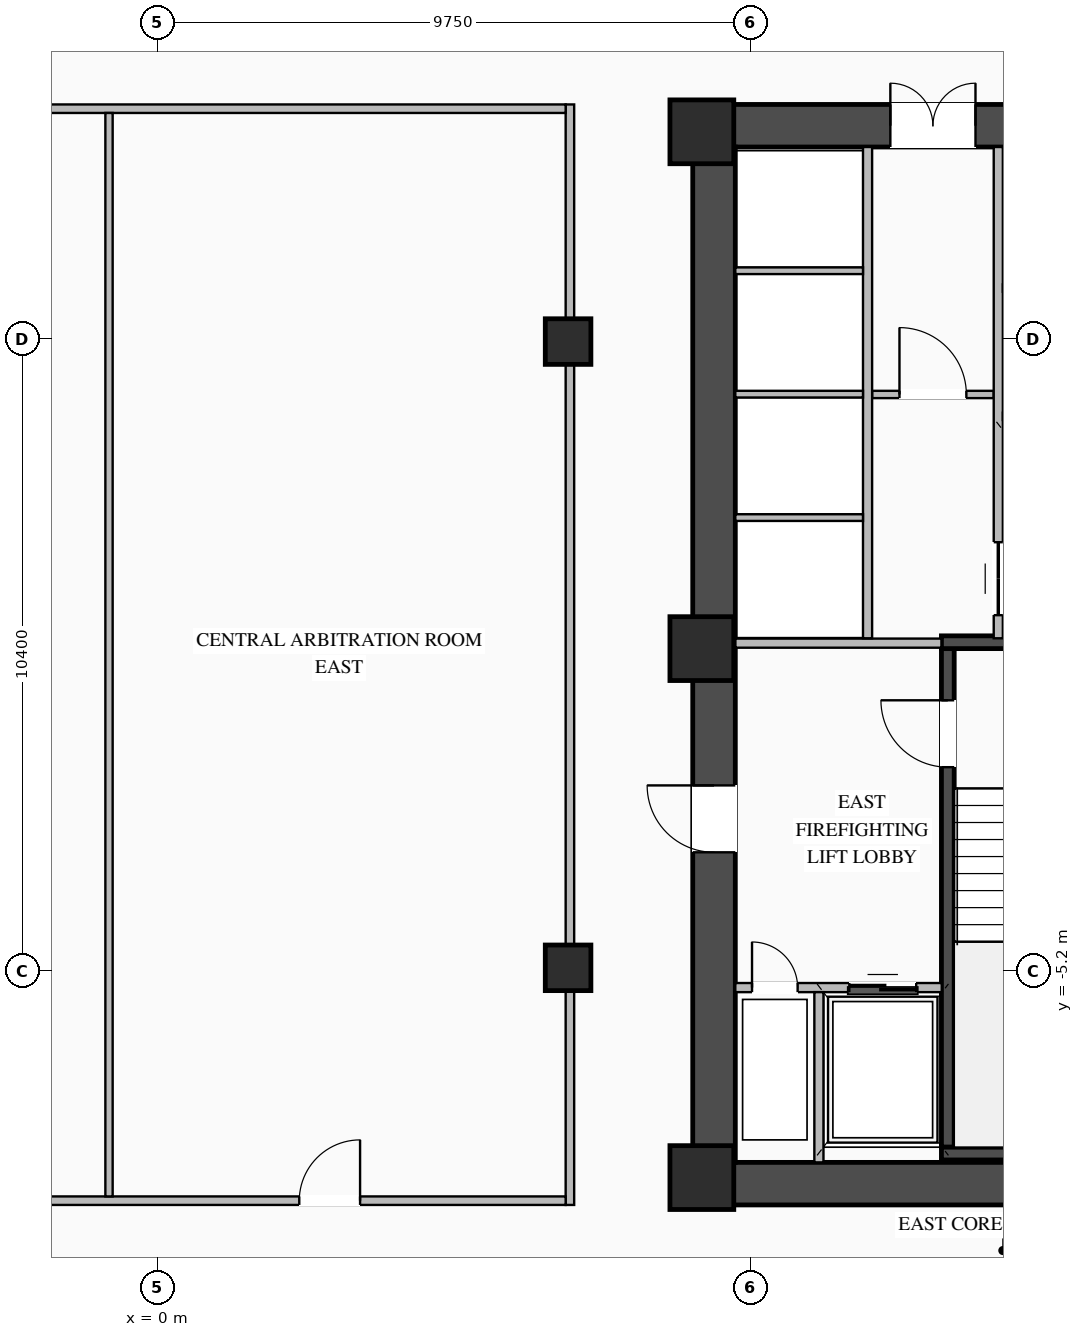
"""IFC4 building model, lengths in metres.
Left out: names, types, materials, properties, quantities, classifications, styles, units other than length and angle.
Written with IfcOpenShell. Run it as: python <this file> out.ifc"""

import sys

from ifc_helpers import new_model, si_unit, direction, frame, frame_2d, origin, origin_2d, place, context, subcontext, project, spatial, rectangle, i_section, extrude, element, fill, save


model = new_model("IFC4")
c1 = context("Model", 3, precision=1e-05, world=origin(), true_north=direction((0.0, 1.0)))
c2 = subcontext(c1, "Body", "Model", "MODEL_VIEW")
j1 = project(units=[si_unit("LENGTHUNIT", "METRE"), si_unit("PLANEANGLEUNIT", "RADIAN")], contexts=[c1])
p1 = place(None, origin())
s1 = spatial("IfcSite", under=j1, at=p1, CompositionType="ELEMENT")
p2 = place(p1, origin())
s2 = spatial("IfcBuilding", under=s1, at=p2, CompositionType="ELEMENT")
p3 = place(p2, frame((0.0, 0.0, 84.55)))
s3 = spatial("IfcBuildingStorey", under=s2, at=p3, CompositionType="ELEMENT", Elevation=84.55)
p4 = place(p3, frame((8.8, -8.7, 0.0), z_axis=(0.0, 0.0, 1.0), x_axis=(1.0, 0.0, 0.0)))
e1 = element("IfcWall", 1, at=p4, inside=s3, PredefinedType="SHEAR", context=c2, shape_type="SweptSolid", body=[
    extrude(rectangle(XDim=10.25, YDim=0.7, at=frame_2d((5.125, 0.0))), origin(), (0.0, 0.0, 1.0), 3.27),
])
p5 = place(p3, frame((8.8, 8.7, 0.0), z_axis=(0.0, 0.0, 1.0), x_axis=(1.0, 0.0, 0.0)))
e2 = element("IfcWall", 2, at=p5, inside=s3, PredefinedType="SHEAR", context=c2, shape_type="SweptSolid", body=[
    extrude(rectangle(XDim=10.25, YDim=0.7, at=frame_2d((5.125, 0.0))), origin(), (0.0, 0.0, 1.0), 3.27),
])
p6 = place(p5, frame((3.25, 0.0, 0.0)))
e3 = element("IfcOpeningElement", 3, at=p6, cuts=e2, PredefinedType="OPENING", context=c2, shape_type="SweptSolid", body=[
    extrude(rectangle(XDim=1.4, YDim=2.05, at=frame_2d((0.7, 1.025))), frame((0.0, 0.36, 0.0), z_axis=(0.0, -1.0, 0.0), x_axis=(1.0, 0.0, 0.0)), (0.0, 0.0, 1.0), 0.72),
])
p7 = place(p3, frame((9.15, -8.35, 0.0), z_axis=(0.0, 0.0, 1.0), x_axis=(0.0, 1.0, 0.0)))
e4 = element("IfcWall", 4, at=p7, inside=s3, PredefinedType="SHEAR", context=c2, shape_type="SweptSolid", body=[
    extrude(rectangle(XDim=16.7, YDim=0.7, at=frame_2d((8.35, 0.0))), origin(), (0.0, 0.0, 1.0), 3.27),
])
p8 = place(p7, frame((5.1, 0.0, 0.0)))
e5 = element("IfcOpeningElement", 5, at=p8, cuts=e4, PredefinedType="OPENING", context=c2, shape_type="SweptSolid", body=[
    extrude(rectangle(XDim=1.1, YDim=2.08, at=frame_2d((0.55, 1.04))), frame((0.0, 0.36, 0.0), z_axis=(0.0, -1.0, 0.0), x_axis=(1.0, 0.0, 0.0)), (0.0, 0.0, 1.0), 0.72),
])
p9 = place(p3, frame((12.995, -8.1, 0.0), z_axis=(0.0, 0.0, 1.0), x_axis=(0.0, 1.0, 0.0)))
e6 = element("IfcWall", 6, at=p9, inside=s3, PredefinedType="SHEAR", context=c2, shape_type="SweptSolid", body=[
    extrude(rectangle(XDim=8.2, YDim=0.21, at=frame_2d((4.1, 0.0))), origin(), (0.0, 0.0, 1.0), 3.27),
])
p10 = place(p9, frame((6.25, 0.0, 0.0)))
e7 = element("IfcOpeningElement", 7, at=p10, cuts=e6, PredefinedType="OPENING", context=c2, shape_type="SweptSolid", body=[
    extrude(rectangle(XDim=1.1, YDim=2.15, at=frame_2d((0.55, 1.075))), frame((0.0, 0.115, 0.0), z_axis=(0.0, -1.0, 0.0), x_axis=(1.0, 0.0, 0.0)), (0.0, 0.0, 1.0), 0.23),
])
for number, where, z_axis, x_axis in (
    (8, (12.89, -8.205, 0.0), (0.0, 0.0, 1.0), (1.0, 0.0, 0.0)),
    (9, (18.03, 0.205, 0.0), (0.0, 0.0, 1.0), (-1.0, 0.0, 0.0)),
):
    element("IfcWall", number, at=place(p3, frame(where, z_axis=z_axis, x_axis=x_axis)), inside=s3, PredefinedType="SHEAR", context=c2, shape_type="SweptSolid", body=[
        extrude(rectangle(XDim=5.14, YDim=0.21, at=frame_2d((2.57, 0.0))), origin(), (0.0, 0.0, 1.0), 3.27),
    ])
for number, where, z_axis, x_axis in (
    (10, (8.95, -8.6, 0.0), (0.0, 0.0, 1.0), (1.0, 0.0, 0.0)),
    (11, (8.95, 0.1, 0.0), (0.0, 0.0, 1.0), (1.0, 0.0, 0.0)),
    (12, (8.95, 8.6, 0.0), (0.0, 0.0, 1.0), (1.0, 0.0, 0.0)),
):
    element("IfcColumn", number, at=place(p3, frame(where, z_axis=z_axis, x_axis=x_axis)), inside=s3, PredefinedType="COLUMN", context=c2, shape_type="SweptSolid", body=[
        extrude(rectangle(XDim=1.05, YDim=1.05, at=origin_2d()), origin(), (0.0, 0.0, 1.0), 3.45),
    ])
for number, where, z_axis, x_axis in (
    (13, (6.75, -5.15, 0.0), (0.0, 0.0, 1.0), (1.0, 0.0, 0.0)),
    (14, (6.75, 5.15, 0.0), (0.0, 0.0, 1.0), (1.0, 0.0, 0.0)),
):
    element("IfcColumn", number, at=place(p3, frame(where, z_axis=z_axis, x_axis=x_axis)), inside=s3, PredefinedType="COLUMN", context=c2, shape_type="SweptSolid", body=[
        extrude(i_section(OverallWidth=0.75, OverallDepth=0.75, WebThickness=0.03, FlangeThickness=0.044, at=origin_2d()), origin(), (0.0, 0.0, 1.0), 3.45),
    ])
p11 = place(p3, frame((9.5, -5.475, 0.0), z_axis=(0.0, 0.0, 1.0), x_axis=(1.0, 0.0, 0.0)))
e15 = element("IfcWall", 15, at=p11, inside=s3, PredefinedType="STANDARD", context=c2, shape_type="SweptSolid", body=[
    extrude(rectangle(XDim=3.395, YDim=0.15, at=frame_2d((1.698, 0.0))), origin(), (0.0, 0.0, 1.0), 3.25),
])
p12 = place(p11, frame((1.875, 0.0, 0.0)))
e16 = element("IfcOpeningElement", 16, at=p12, cuts=e15, PredefinedType="OPENING", context=c2, shape_type="SweptSolid", body=[
    extrude(rectangle(XDim=1.1, YDim=2.15, at=frame_2d((0.55, 1.075))), frame((0.0, 0.085, 0.0), z_axis=(0.0, -1.0, 0.0), x_axis=(1.0, 0.0, 0.0)), (0.0, 0.0, 1.0), 0.17),
])
p13 = place(p11, frame((0.275, 0.0, 0.0)))
e17 = element("IfcOpeningElement", 17, at=p13, cuts=e15, PredefinedType="OPENING", context=c2, shape_type="SweptSolid", body=[
    extrude(rectangle(XDim=0.75, YDim=2.05, at=frame_2d((0.375, 1.025))), frame((0.0, 0.085, 0.0), z_axis=(0.0, -1.0, 0.0), x_axis=(1.0, 0.0, 0.0)), (0.0, 0.0, 1.0), 0.17),
])
p14 = place(p3, frame((10.875, -8.35, 0.0), z_axis=(0.0, 0.0, 1.0), x_axis=(0.0, 1.0, 0.0)))
e18 = element("IfcWall", 18, at=p14, inside=s3, PredefinedType="STANDARD", context=c2, shape_type="SweptSolid", body=[
    extrude(rectangle(XDim=2.8, YDim=0.15, at=frame_2d((1.4, 0.0))), origin(), (0.0, 0.0, 1.0), 3.25),
])
p15 = place(p3, frame((9.5, 0.19, 0.0), z_axis=(0.0, 0.0, 1.0), x_axis=(1.0, 0.0, 0.0)))
e19 = element("IfcWall", 19, at=p15, inside=s3, PredefinedType="STANDARD", context=c2, shape_type="SweptSolid", body=[
    extrude(rectangle(XDim=3.39, YDim=0.15, at=frame_2d((1.695, 0.0))), origin(), (0.0, 0.0, 1.0), 2.645),
])
p16 = place(p3, frame((11.75, 4.28, 0.0), z_axis=(0.0, 0.0, 1.0), x_axis=(1.0, 0.0, 0.0)))
e20 = element("IfcWall", 20, at=p16, inside=s3, PredefinedType="STANDARD", context=c2, shape_type="SweptSolid", body=[
    extrude(rectangle(XDim=2.0, YDim=0.12, at=frame_2d((1.0, 0.0))), origin(), (0.0, 0.0, 1.0), 3.25),
])
p17 = place(p16, frame((0.45, 0.0, 0.0)))
e21 = element("IfcOpeningElement", 21, at=p17, cuts=e20, PredefinedType="OPENING", context=c2, shape_type="SweptSolid", body=[
    extrude(rectangle(XDim=1.1, YDim=2.1, at=frame_2d((0.55, 1.05))), frame((0.0, 0.07, 0.0), z_axis=(0.0, -1.0, 0.0), x_axis=(1.0, 0.0, 0.0)), (0.0, 0.0, 1.0), 0.14),
])
p18 = place(p3, frame((11.675, 0.27, 0.0), z_axis=(0.0, 0.0, 1.0), x_axis=(0.0, 1.0, 0.0)))
e22 = element("IfcWall", 22, at=p18, inside=s3, PredefinedType="STANDARD", context=c2, shape_type="SweptSolid", body=[
    extrude(rectangle(XDim=8.08, YDim=0.15, at=frame_2d((4.04, 0.0))), origin(), (0.0, 0.0, 1.0), 3.25),
])
for number, where, z_axis, x_axis in (
    (23, (9.5, 2.255, 0.0), (0.0, 0.0, 1.0), (1.0, 0.0, 0.0)),
    (24, (9.5, 4.285, 0.0), (0.0, 0.0, 1.0), (1.0, 0.0, 0.0)),
    (25, (9.5, 6.315, 0.0), (0.0, 0.0, 1.0), (1.0, 0.0, 0.0)),
):
    element("IfcWall", number, at=place(p3, frame(where, z_axis=z_axis, x_axis=x_axis)), inside=s3, PredefinedType="STANDARD", context=c2, shape_type="SweptSolid", body=[
        extrude(rectangle(XDim=2.1, YDim=0.11, at=frame_2d((1.05, 0.0))), origin(), (0.0, 0.0, 1.0), 3.25),
    ])
p19 = place(p3, frame((13.825, 0.27, 0.0), z_axis=(0.0, 0.0, 1.0), x_axis=(0.0, 1.0, 0.0)))
e26 = element("IfcWall", 26, at=p19, inside=s3, PredefinedType="STANDARD", context=c2, shape_type="SweptSolid", body=[
    extrude(rectangle(XDim=8.08, YDim=0.15, at=frame_2d((4.04, 0.0))), origin(), (0.0, 0.0, 1.0), 3.25),
])
p20 = place(p19, frame((0.38, 0.0, 0.0)))
e27 = element("IfcOpeningElement", 27, at=p20, cuts=e26, PredefinedType="OPENING", context=c2, shape_type="SweptSolid", body=[
    extrude(rectangle(XDim=1.2, YDim=2.1, at=frame_2d((0.6, 1.05))), frame((0.0, 0.085, 0.0), z_axis=(0.0, -1.0, 0.0), x_axis=(1.0, 0.0, 0.0)), (0.0, 0.0, 1.0), 0.17),
])
p21 = place(p3, frame((6.78, -9.05, 0.0), z_axis=(0.0, 0.0, 1.0), x_axis=(0.0, 1.0, 0.0)))
e28 = element("IfcWall", 28, at=p21, inside=s3, PredefinedType="STANDARD", context=c2, shape_type="SweptSolid", body=[
    extrude(rectangle(XDim=18.1, YDim=0.14, at=frame_2d((9.05, 0.0))), origin(), (0.0, 0.0, 1.0), 2.645),
])
p22 = place(p3, frame((-6.71, -8.98, 0.0), z_axis=(0.0, 0.0, 1.0), x_axis=(1.0, 0.0, 0.0)))
e29 = element("IfcWall", 29, at=p22, inside=s3, PredefinedType="STANDARD", context=c2, shape_type="SweptSolid", body=[
    extrude(rectangle(XDim=13.42, YDim=0.14, at=frame_2d((6.71, 0.0))), origin(), (0.0, 0.0, 1.0), 3.25),
])
p23 = place(p22, frame((2.581, 0.0, 0.0)))
e30 = element("IfcOpeningElement", 30, at=p23, cuts=e29, PredefinedType="OPENING", context=c2, shape_type="SweptSolid", body=[
    extrude(rectangle(XDim=1.0, YDim=2.08, at=frame_2d((0.5, 1.04))), frame((0.0, 0.08, 0.0), z_axis=(0.0, -1.0, 0.0), x_axis=(1.0, 0.0, 0.0)), (0.0, 0.0, 1.0), 0.16),
])
p24 = place(p22, frame((9.039, 0.0, 0.0)))
e31 = element("IfcOpeningElement", 31, at=p24, cuts=e29, PredefinedType="OPENING", context=c2, shape_type="SweptSolid", body=[
    extrude(rectangle(XDim=1.0, YDim=2.08, at=frame_2d((0.5, 1.04))), frame((0.0, 0.08, 0.0), z_axis=(0.0, -1.0, 0.0), x_axis=(1.0, 0.0, 0.0)), (0.0, 0.0, 1.0), 0.16),
])
p25 = place(p3, frame((-6.71, 8.98, 0.0), z_axis=(0.0, 0.0, 1.0), x_axis=(1.0, 0.0, 0.0)))
e32 = element("IfcWall", 32, at=p25, inside=s3, PredefinedType="STANDARD", context=c2, shape_type="SweptSolid", body=[
    extrude(rectangle(XDim=13.42, YDim=0.14, at=frame_2d((6.71, 0.0))), origin(), (0.0, 0.0, 1.0), 3.25),
])
p26 = place(p3, frame((-0.8, -8.91, 0.0), z_axis=(0.0, 0.0, 1.0), x_axis=(0.0, 1.0, 0.0)))
e33 = element("IfcWall", 33, at=p26, inside=s3, PredefinedType="STANDARD", context=c2, shape_type="SweptSolid", body=[
    extrude(rectangle(XDim=17.82, YDim=0.12, at=frame_2d((8.91, 0.0))), origin(), (0.0, 0.0, 1.0), 3.25),
])
p27 = place(p10, origin())
e34 = element("IfcDoor", 34, at=p27, inside=s3, OperationType="SINGLE_SWING_RIGHT", PredefinedType="DOOR", context=c2, shape_type="SweptSolid", body=[
    extrude(rectangle(XDim=1.1, YDim=2.15, at=frame_2d((0.55, 1.075))), frame((0.0, 0.025, 0.0), z_axis=(0.0, -1.0, 0.0), x_axis=(1.0, 0.0, 0.0)), (0.0, 0.0, 1.0), 0.05),
])
fill(e7, e34)
p28 = place(p12, origin())
e35 = element("IfcDoor", 35, at=p28, inside=s3, OperationType="DOUBLE_DOOR_SLIDING", PredefinedType="DOOR", context=c2, shape_type="SweptSolid", body=[
    extrude(rectangle(XDim=1.1, YDim=2.15, at=frame_2d((0.55, 1.075))), frame((0.0, 0.025, 0.0), z_axis=(0.0, -1.0, 0.0), x_axis=(1.0, 0.0, 0.0)), (0.0, 0.0, 1.0), 0.05),
])
fill(e16, e35)
p29 = place(p13, origin())
e36 = element("IfcDoor", 36, at=p29, inside=s3, OperationType="SINGLE_SWING_LEFT", PredefinedType="DOOR", context=c2, shape_type="SweptSolid", body=[
    extrude(rectangle(XDim=0.75, YDim=2.05, at=frame_2d((0.375, 1.025))), frame((0.0, 0.025, 0.0), z_axis=(0.0, -1.0, 0.0), x_axis=(1.0, 0.0, 0.0)), (0.0, 0.0, 1.0), 0.05),
])
fill(e17, e36)
p30 = place(p8, origin())
e37 = element("IfcDoor", 37, at=p30, inside=s3, OperationType="SINGLE_SWING_RIGHT", PredefinedType="DOOR", context=c2, shape_type="SweptSolid", body=[
    extrude(rectangle(XDim=1.1, YDim=2.08, at=frame_2d((0.55, 1.04))), frame((0.0, -0.255, 0.0), z_axis=(0.0, -1.0, 0.0), x_axis=(1.0, 0.0, 0.0)), (0.0, 0.0, 1.0), 0.05),
])
fill(e5, e37)
p31 = place(p17, origin())
e38 = element("IfcDoor", 38, at=p31, inside=s3, OperationType="SINGLE_SWING_LEFT", PredefinedType="DOOR", context=c2, shape_type="SweptSolid", body=[
    extrude(rectangle(XDim=1.1, YDim=2.1, at=frame_2d((0.55, 1.05))), frame((0.0, 0.025, 0.0), z_axis=(0.0, -1.0, 0.0), x_axis=(1.0, 0.0, 0.0)), (0.0, 0.0, 1.0), 0.05),
])
fill(e21, e38)
p32 = place(p6, origin())
e39 = element("IfcDoor", 39, at=p32, inside=s3, OperationType="DOUBLE_DOOR_SINGLE_SWING", PredefinedType="DOOR", context=c2, shape_type="SweptSolid", body=[
    extrude(rectangle(XDim=1.4, YDim=2.05, at=frame_2d((0.7, 1.025))), frame((0.0, 0.295, 0.0), z_axis=(0.0, -1.0, 0.0), x_axis=(1.0, 0.0, 0.0)), (0.0, 0.0, 1.0), 0.05),
])
fill(e3, e39)
p33 = place(p20, origin())
e40 = element("IfcDoor", 40, at=p33, inside=s3, OperationType="DOUBLE_DOOR_SLIDING", PredefinedType="DOOR", context=c2, shape_type="SweptSolid", body=[
    extrude(rectangle(XDim=1.2, YDim=2.1, at=frame_2d((0.6, 1.05))), frame((0.0, 0.025, 0.0), z_axis=(0.0, -1.0, 0.0), x_axis=(1.0, 0.0, 0.0)), (0.0, 0.0, 1.0), 0.05),
])
fill(e27, e40)
p34 = place(p24, origin())
e41 = element("IfcDoor", 41, at=p34, inside=s3, OperationType="SINGLE_SWING_RIGHT", PredefinedType="DOOR", context=c2, shape_type="SweptSolid", body=[
    extrude(rectangle(XDim=1.0, YDim=2.08, at=frame_2d((0.5, 1.04))), frame((0.0, 0.025, 0.0), z_axis=(0.0, -1.0, 0.0), x_axis=(1.0, 0.0, 0.0)), (0.0, 0.0, 1.0), 0.05),
])
fill(e31, e41)
save(model, sys.argv[1])
